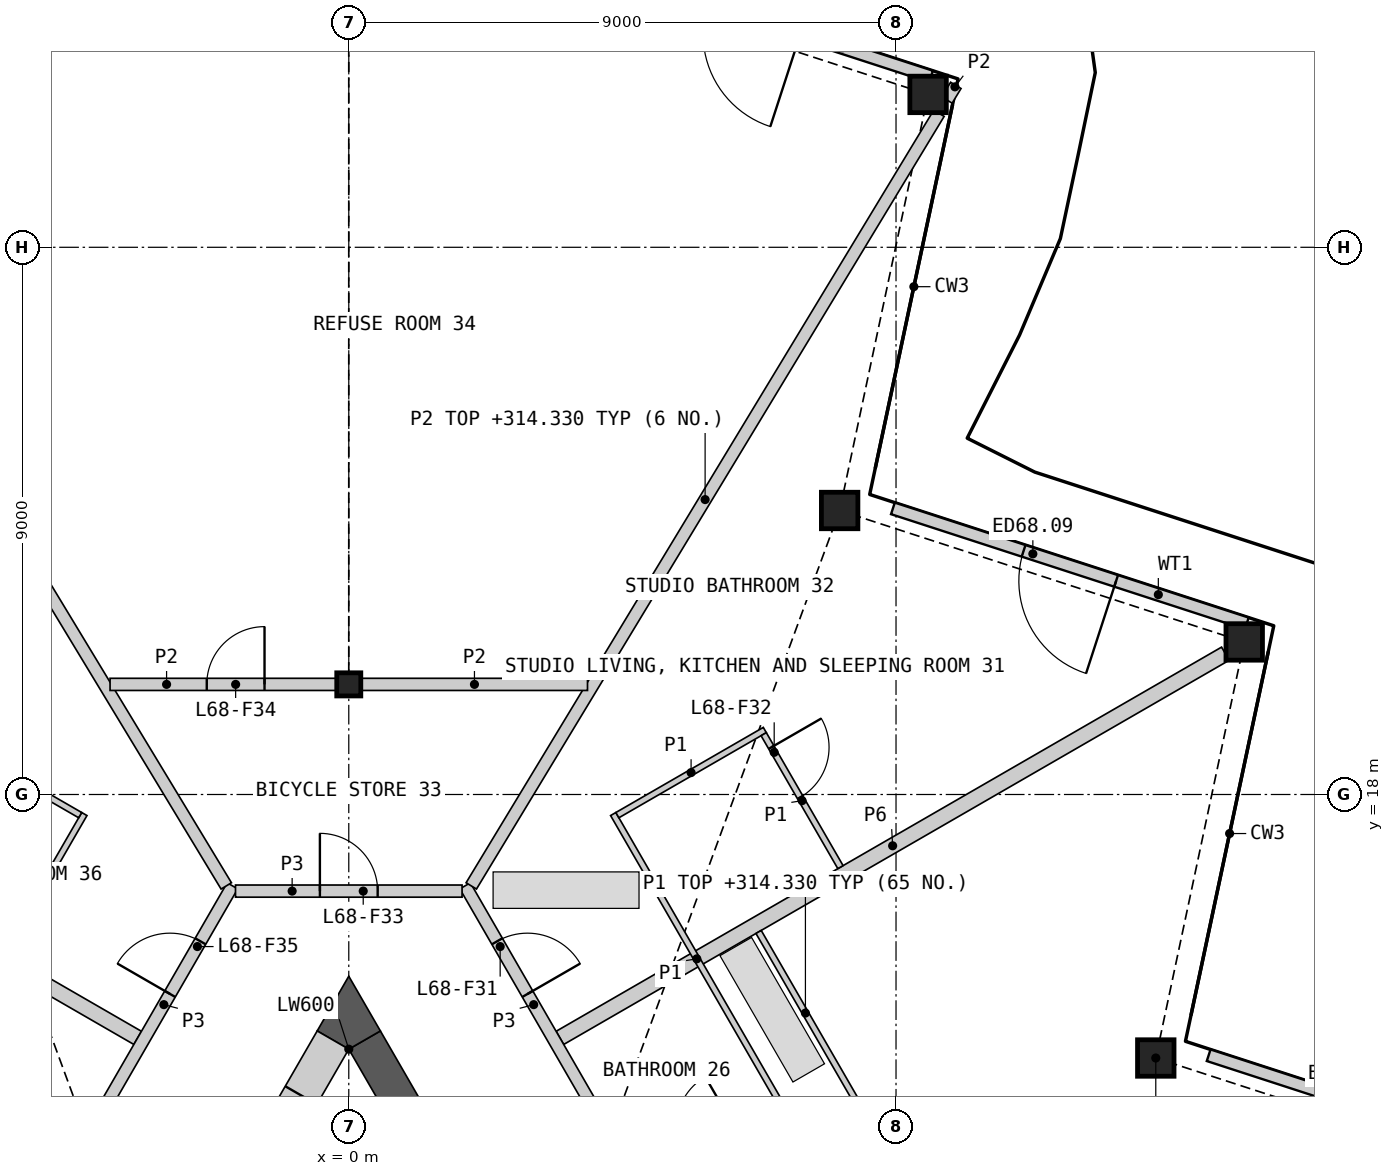
"""IFC4 building model, lengths in metres.
Left out: names, types, materials, properties, quantities, classifications, styles, units other than length and angle.
Written with IfcOpenShell. Run it as: python <this file> out.ifc"""

import sys

from ifc_helpers import new_model, si_unit, direction, frame, frame_2d, origin, origin_2d, place, context, subcontext, project, spatial, polyline, rectangle, hollow_rectangle, i_section, outline, extrude, element, fill, save


model = new_model("IFC4")
c1 = context("Model", 3, precision=1e-05, world=origin(), true_north=direction((0.0, 1.0)))
c2 = subcontext(c1, "Body", "Model", "MODEL_VIEW")
j1 = project(units=[si_unit("LENGTHUNIT", "METRE"), si_unit("PLANEANGLEUNIT", "RADIAN")], contexts=[c1])
p1 = place(None, origin())
s1 = spatial("IfcSite", under=j1, at=p1, CompositionType="ELEMENT")
p2 = place(p1, origin())
s2 = spatial("IfcBuilding", under=s1, at=p2, CompositionType="ELEMENT")
p3 = place(p2, frame((0.0, 0.0, 312.0)))
s3 = spatial("IfcBuildingStorey", under=s2, at=p3, CompositionType="ELEMENT", Elevation=312.0)
for number, where, z_axis, x_axis in (
    (1, (13.272, 13.666, 0.0), (0.0, 0.0, 1.0), (1.0, 0.0, 0.0)),
    (2, (14.727, 20.509, 0.0), (0.0, 0.0, 1.0), (1.0, 0.0, 0.0)),
    (3, (8.073, 22.671, 0.0), (0.0, 0.0, 1.0), (1.0, 0.0, 0.0)),
    (4, (9.527, 29.514, 0.0), (0.0, 0.0, 1.0), (1.0, 0.0, 0.0)),
):
    element("IfcColumn", number, at=place(p3, frame(where, z_axis=z_axis, x_axis=x_axis)), inside=s3, PredefinedType="COLUMN", context=c2, shape_type="SweptSolid", body=[
        extrude(hollow_rectangle(XDim=0.6, YDim=0.6, WallThickness=0.04, at=origin_2d()), origin(), (0.0, 0.0, 1.0), 3.4),
    ])
p4 = place(p3, frame((0.0, 19.811, 0.0), z_axis=(0.0, 0.0, 1.0), x_axis=(1.0, 0.0, 0.0)))
e5 = element("IfcColumn", 5, at=p4, inside=s3, PredefinedType="COLUMN", context=c2, shape_type="SweptSolid", body=[
    extrude(i_section(OverallWidth=0.396, OverallDepth=0.381, WebThickness=0.019, FlangeThickness=0.03, at=origin_2d()), origin(), (0.0, 0.0, 1.0), 3.4),
])
p5 = place(p3, frame((19.962, 11.82, 0.0), z_axis=(0.0, 0.0, 1.0), x_axis=(-0.951053709789, 0.309025631781, 0.0)))
e6 = element("IfcWall", 6, at=p5, inside=s3, PredefinedType="SOLIDWALL", context=c2, shape_type="SweptSolid", body=[
    extrude(rectangle(XDim=6.12, YDim=0.2, at=frame_2d((3.06, 0.0))), origin(), (0.0, 0.0, 1.0), 2.488),
])
p6 = place(p5, frame((2.26, 0.0, 0.0)))
e7 = element("IfcOpeningElement", 7, at=p6, cuts=e6, PredefinedType="OPENING", context=c2, shape_type="SweptSolid", body=[
    extrude(rectangle(XDim=1.6, YDim=2.25, at=frame_2d((0.8, 1.125))), frame((0.0, 0.11, 0.0), z_axis=(0.0, -1.0, 0.0), x_axis=(1.0, 0.0, 0.0)), (0.0, 0.0, 1.0), 0.22),
])
p7 = place(p3, frame((14.769, 20.814, 0.0), z_axis=(0.0, 0.0, 1.0), x_axis=(-0.951069243123, 0.308977822483, 0.0)))
e8 = element("IfcWall", 8, at=p7, inside=s3, PredefinedType="SOLIDWALL", context=c2, shape_type="SweptSolid", body=[
    extrude(rectangle(XDim=6.12, YDim=0.2, at=frame_2d((3.06, 0.0))), origin(), (0.0, 0.0, 1.0), 2.488),
])
p8 = place(p7, frame((2.26, 0.0, 0.0)))
e9 = element("IfcOpeningElement", 9, at=p8, cuts=e8, PredefinedType="OPENING", context=c2, shape_type="SweptSolid", body=[
    extrude(rectangle(XDim=1.6, YDim=2.25, at=frame_2d((0.8, 1.125))), frame((0.0, 0.11, 0.0), z_axis=(0.0, -1.0, 0.0), x_axis=(1.0, 0.0, 0.0)), (0.0, 0.0, 1.0), 0.22),
])
p9 = place(p3, frame((9.576, 29.809, 0.0), z_axis=(0.0, 0.0, 1.0), x_axis=(-0.951053709789, 0.309025631781, 0.0)))
e10 = element("IfcWall", 10, at=p9, inside=s3, PredefinedType="SOLIDWALL", context=c2, shape_type="SweptSolid", body=[
    extrude(rectangle(XDim=6.12, YDim=0.2, at=frame_2d((3.06, 0.0))), origin(), (0.0, 0.0, 1.0), 2.488),
])
p10 = place(p9, frame((2.26, 0.0, 0.0)))
e11 = element("IfcOpeningElement", 11, at=p10, cuts=e10, PredefinedType="OPENING", context=c2, shape_type="SweptSolid", body=[
    extrude(rectangle(XDim=1.6, YDim=2.25, at=frame_2d((0.8, 1.125))), frame((0.0, 0.11, 0.0), z_axis=(0.0, -1.0, 0.0), x_axis=(1.0, 0.0, 0.0)), (0.0, 0.0, 1.0), 0.22),
])
p11 = place(p3, frame((2.361, 10.322, 0.0), z_axis=(0.0, 0.0, 1.0), x_axis=(-0.500000735859, 0.866024978935, 0.0)))
e12 = element("IfcWall", 12, at=p11, inside=s3, PredefinedType="SHEAR", context=c2, shape_type="SweptSolid", body=[
    extrude(rectangle(XDim=4.202, YDim=0.6, at=frame_2d((2.101, 0.0))), origin(), (0.0, 0.0, 1.0), 3.1),
])
p12 = place(p3, origin())
e13 = element("IfcWall", 13, at=p12, inside=s3, PredefinedType="SHEAR", context=c2, shape_type="SweptSolid", body=[
    extrude(outline(polyline([(0.0, 13.811), (-0.52, 14.111), (0.0, 15.011), (0.52, 14.111), (0.0, 13.811)])), origin(), (0.0, 0.0, 1.0), 3.1),
])
p13 = place(p3, frame((-0.26, 13.961, 0.0), z_axis=(0.0, 0.0, 1.0), x_axis=(-0.49997936161, -0.866037319036, 0.0)))
e14 = element("IfcWall", 14, at=p13, inside=s3, PredefinedType="SHEAR", context=c2, shape_type="SweptSolid", body=[
    extrude(rectangle(XDim=2.66, YDim=0.6, at=frame_2d((1.33, 0.0))), origin(), (0.0, 0.0, 1.0), 3.1),
])
p14 = place(p13, frame((1.05, 0.0, 0.0)))
e15 = element("IfcOpeningElement", 15, at=p14, cuts=e14, PredefinedType="OPENING", context=c2, shape_type="SweptSolid", body=[
    extrude(rectangle(XDim=1.0, YDim=2.1, at=frame_2d((0.5, 1.05))), frame((0.0, 0.31, 0.0), z_axis=(0.0, -1.0, 0.0), x_axis=(1.0, 0.0, 0.0)), (0.0, 0.0, 1.0), 0.62),
])
p15 = place(p3, frame((3.472, 13.997, 0.0), z_axis=(0.0, 0.0, 1.0), x_axis=(0.866029233976, 0.499993365855, 0.0)))
e16 = element("IfcWall", 16, at=p15, inside=s3, PredefinedType="PARTITIONING", context=c2, shape_type="SweptSolid", body=[
    extrude(rectangle(XDim=12.637, YDim=0.25, at=frame_2d((6.319, 0.0))), origin(), (0.0, 0.0, 1.0), 2.33),
])
p16 = place(p3, frame((-8.257, 16.76, 0.0), z_axis=(0.0, 0.0, 1.0), x_axis=(0.866034739526, -0.499983829672, 0.0)))
e17 = element("IfcWall", 17, at=p16, inside=s3, PredefinedType="PARTITIONING", context=c2, shape_type="SweptSolid", body=[
    extrude(rectangle(XDim=5.525, YDim=0.25, at=frame_2d((2.763, 0.0))), origin(), (0.0, 0.0, 1.0), 2.33),
])
p17 = place(p3, frame((1.913, 16.498, 0.0), z_axis=(0.0, 0.0, 1.0), x_axis=(0.499950370306, -0.866054055606, 0.0)))
e18 = element("IfcWall", 18, at=p17, inside=s3, PredefinedType="PARTITIONING", context=c2, shape_type="SweptSolid", body=[
    extrude(rectangle(XDim=4.513, YDim=0.2, at=frame_2d((2.256, 0.0))), origin(), (0.0, 0.0, 1.0), 3.1),
])
p18 = place(p17, frame((1.053, 0.0, 0.0)))
e19 = element("IfcOpeningElement", 19, at=p18, cuts=e18, PredefinedType="OPENING", context=c2, shape_type="SweptSolid", body=[
    extrude(rectangle(XDim=1.0, YDim=2.1, at=frame_2d((0.5, 1.05))), frame((0.0, 0.11, 0.0), z_axis=(0.0, -1.0, 0.0), x_axis=(1.0, 0.0, 0.0)), (0.0, 0.0, 1.0), 0.22),
])
p19 = place(p3, frame((-4.169, 12.59, 0.0), z_axis=(0.0, 0.0, 1.0), x_axis=(0.499950370306, 0.866054055606, 0.0)))
e20 = element("IfcWall", 20, at=p19, inside=s3, PredefinedType="PARTITIONING", context=c2, shape_type="SweptSolid", body=[
    extrude(rectangle(XDim=4.513, YDim=0.2, at=frame_2d((2.256, 0.0))), origin(), (0.0, 0.0, 1.0), 3.1),
])
p20 = place(p19, frame((2.459, 0.0, 0.0)))
e21 = element("IfcOpeningElement", 21, at=p20, cuts=e20, PredefinedType="OPENING", context=c2, shape_type="SweptSolid", body=[
    extrude(rectangle(XDim=1.0, YDim=2.1, at=frame_2d((0.5, 1.05))), frame((0.0, 0.11, 0.0), z_axis=(0.0, -1.0, 0.0), x_axis=(1.0, 0.0, 0.0)), (0.0, 0.0, 1.0), 0.22),
])
p21 = place(p3, frame((-1.863, 16.411, 0.0), z_axis=(0.0, 0.0, 1.0), x_axis=(1.0, 0.0, 0.0)))
e22 = element("IfcWall", 22, at=p21, inside=s3, PredefinedType="PARTITIONING", context=c2, shape_type="SweptSolid", body=[
    extrude(rectangle(XDim=3.726, YDim=0.2, at=frame_2d((1.863, 0.0))), origin(), (0.0, 0.0, 1.0), 3.1),
])
p22 = place(p21, frame((1.388, 0.0, 0.0)))
e23 = element("IfcOpeningElement", 23, at=p22, cuts=e22, PredefinedType="OPENING", context=c2, shape_type="SweptSolid", body=[
    extrude(rectangle(XDim=0.95, YDim=2.1, at=frame_2d((0.475, 1.05))), frame((0.0, 0.11, 0.0), z_axis=(0.0, -1.0, 0.0), x_axis=(1.0, 0.0, 0.0)), (0.0, 0.0, 1.0), 0.22),
])
p23 = place(p3, frame((2.015, 16.497, 0.0), z_axis=(0.0, 0.0, 1.0), x_axis=(0.517779253395, 0.855514257482, 0.0)))
e24 = element("IfcWall", 24, at=p23, inside=s3, PredefinedType="PARTITIONING", context=c2, shape_type="SweptSolid", body=[
    extrude(rectangle(XDim=14.854, YDim=0.2, at=frame_2d((7.427, 0.0))), origin(), (0.0, 0.0, 1.0), 2.33),
])
p24 = place(p3, frame((-9.669, 29.144, 0.0), z_axis=(0.0, 0.0, 1.0), x_axis=(0.517770554559, -0.85551952218, 0.0)))
e25 = element("IfcWall", 25, at=p24, inside=s3, PredefinedType="PARTITIONING", context=c2, shape_type="SweptSolid", body=[
    extrude(rectangle(XDim=14.784, YDim=0.2, at=frame_2d((7.392, 0.0))), origin(), (0.0, 0.0, 1.0), 2.33),
])
p25 = place(p3, frame((-3.926, 19.811, 0.0), z_axis=(0.0, 0.0, 1.0), x_axis=(1.0, 0.0, 0.0)))
e26 = element("IfcWall", 26, at=p25, inside=s3, PredefinedType="PARTITIONING", context=c2, shape_type="SweptSolid", body=[
    extrude(rectangle(XDim=3.718, YDim=0.2, at=frame_2d((1.859, 0.0))), origin(), (0.0, 0.0, 1.0), 2.33),
])
p26 = place(p25, frame((1.59, 0.0, 0.0)))
e27 = element("IfcOpeningElement", 27, at=p26, cuts=e26, PredefinedType="OPENING", context=c2, shape_type="SweptSolid", body=[
    extrude(rectangle(XDim=0.95, YDim=2.1, at=frame_2d((0.475, 1.05))), frame((0.0, 0.11, 0.0), z_axis=(0.0, -1.0, 0.0), x_axis=(1.0, 0.0, 0.0)), (0.0, 0.0, 1.0), 0.22),
])
p27 = place(p3, frame((0.208, 19.811, 0.0), z_axis=(0.0, 0.0, 1.0), x_axis=(1.0, 0.0, 0.0)))
e28 = element("IfcWall", 28, at=p27, inside=s3, PredefinedType="PARTITIONING", context=c2, shape_type="SweptSolid", body=[
    extrude(rectangle(XDim=3.718, YDim=0.2, at=frame_2d((1.859, 0.0))), origin(), (0.0, 0.0, 1.0), 2.33),
])
p28 = place(p3, frame((9.837, 29.422, 0.0), z_axis=(0.0, 0.0, 1.0), x_axis=(0.517419338909, 0.855731983581, 0.0)))
e29 = element("IfcWall", 29, at=p28, inside=s3, PredefinedType="PARTITIONING", context=c2, shape_type="SweptSolid", body=[
    extrude(rectangle(XDim=0.282, YDim=0.2, at=frame_2d((0.141, 0.0))), origin(), (0.0, 0.0, 1.0), 2.33),
])
p29 = place(p3, frame((6.74, 15.739, 0.0), z_axis=(0.0, 0.0, 1.0), x_axis=(0.499995022685, -0.86602827742, 0.0)))
e30 = element("IfcWall", 30, at=p29, inside=s3, PredefinedType="PARTITIONING", context=c2, shape_type="SweptSolid", body=[
    extrude(rectangle(XDim=15.404, YDim=0.1, at=frame_2d((7.702, 0.0))), origin(), (0.0, 0.0, 1.0), 2.33),
])
p30 = place(p29, frame((8.582, 0.0, 0.0)))
e31 = element("IfcOpeningElement", 31, at=p30, cuts=e30, PredefinedType="OPENING", context=c2, shape_type="SweptSolid", body=[
    extrude(rectangle(XDim=0.95, YDim=2.1, at=frame_2d((0.475, 1.05))), frame((0.0, 0.06, 0.0), z_axis=(0.0, -1.0, 0.0), x_axis=(1.0, 0.0, 0.0)), (0.0, 0.0, 1.0), 0.12),
])
p31 = place(p3, frame((4.349, 17.679, 0.0), z_axis=(0.0, 0.0, 1.0), x_axis=(0.49997732567, -0.866038494419, 0.0)))
e32 = element("IfcWall", 32, at=p31, inside=s3, PredefinedType="PARTITIONING", context=c2, shape_type="SweptSolid", body=[
    extrude(rectangle(XDim=5.5, YDim=0.1, at=frame_2d((2.75, 0.0))), origin(), (0.0, 0.0, 1.0), 2.33),
])
p32 = place(p3, frame((-7.099, 12.915, 0.0), z_axis=(0.0, 0.0, 1.0), x_axis=(0.49997732567, 0.866038494419, 0.0)))
e33 = element("IfcWall", 33, at=p32, inside=s3, PredefinedType="PARTITIONING", context=c2, shape_type="SweptSolid", body=[
    extrude(rectangle(XDim=5.5, YDim=0.1, at=frame_2d((2.75, 0.0))), origin(), (0.0, 0.0, 1.0), 2.33),
])
p33 = place(p32, frame((0.756, 0.0, 0.0)))
e34 = element("IfcOpeningElement", 34, at=p33, cuts=e33, PredefinedType="OPENING", context=c2, shape_type="SweptSolid", body=[
    extrude(rectangle(XDim=0.95, YDim=2.1, at=frame_2d((0.475, 1.05))), frame((0.0, 0.06, 0.0), z_axis=(0.0, -1.0, 0.0), x_axis=(1.0, 0.0, 0.0)), (0.0, 0.0, 1.0), 0.12),
])
for number, where, z_axis, x_axis in (
    (35, (4.417, 17.66, 0.0), (0.0, 0.0, 1.0), (0.866, 0.5, 0.0)),
    (36, (-6.842, 19.06, 0.0), (0.0, 0.0, 1.0), (0.866, -0.5, 0.0)),
):
    element("IfcWall", number, at=place(p3, frame(where, z_axis=z_axis, x_axis=x_axis)), inside=s3, PredefinedType="PARTITIONING", context=c2, shape_type="SweptSolid", body=[
        extrude(rectangle(XDim=2.8, YDim=0.1, at=frame_2d((1.4, 0.0))), origin(), (0.0, 0.0, 1.0), 2.33),
    ])
p34 = place(p3, frame((6.824, 18.992, 0.0), z_axis=(0.0, 0.0, 1.0), x_axis=(0.50001820224, -0.866014894461, 0.0)))
e37 = element("IfcWall", 37, at=p34, inside=s3, PredefinedType="PARTITIONING", context=c2, shape_type="SweptSolid", body=[
    extrude(rectangle(XDim=2.525, YDim=0.1, at=frame_2d((1.262, 0.0))), origin(), (0.0, 0.0, 1.0), 2.33),
])
p35 = place(p34, frame((0.25, 0.0, 0.0)))
e38 = element("IfcOpeningElement", 38, at=p35, cuts=e37, PredefinedType="OPENING", context=c2, shape_type="SweptSolid", body=[
    extrude(rectangle(XDim=0.95, YDim=2.1, at=frame_2d((0.475, 1.05))), frame((0.0, 0.06, 0.0), z_axis=(0.0, -1.0, 0.0), x_axis=(1.0, 0.0, 0.0)), (0.0, 0.0, 1.0), 0.12),
])
p36 = place(p8, origin())
e39 = element("IfcDoor", 39, at=p36, inside=s3, OperationType="DOUBLE_DOOR_SINGLE_SWING", PredefinedType="DOOR", context=c2, shape_type="SweptSolid", body=[
    extrude(rectangle(XDim=1.6, YDim=2.25, at=frame_2d((0.8, 1.125))), frame((0.0, 0.025, 0.0), z_axis=(0.0, -1.0, 0.0), x_axis=(1.0, 0.0, 0.0)), (0.0, 0.0, 1.0), 0.05),
])
fill(e9, e39)
p37 = place(p18, origin())
e40 = element("IfcDoor", 40, at=p37, inside=s3, OperationType="SINGLE_SWING_RIGHT", PredefinedType="DOOR", context=c2, shape_type="SweptSolid", body=[
    extrude(rectangle(XDim=1.0, YDim=2.1, at=frame_2d((0.5, 1.05))), frame((0.0, 0.025, 0.0), z_axis=(0.0, -1.0, 0.0), x_axis=(1.0, 0.0, 0.0)), (0.0, 0.0, 1.0), 0.05),
])
fill(e19, e40)
p38 = place(p35, origin())
e41 = element("IfcDoor", 41, at=p38, inside=s3, OperationType="SINGLE_SWING_LEFT", PredefinedType="DOOR", context=c2, shape_type="SweptSolid", body=[
    extrude(rectangle(XDim=0.95, YDim=2.1, at=frame_2d((0.475, 1.05))), frame((0.0, 0.025, 0.0), z_axis=(0.0, -1.0, 0.0), x_axis=(1.0, 0.0, 0.0)), (0.0, 0.0, 1.0), 0.05),
])
fill(e38, e41)
p39 = place(p22, origin())
e42 = element("IfcDoor", 42, at=p39, inside=s3, OperationType="SINGLE_SWING_LEFT", PredefinedType="DOOR", context=c2, shape_type="SweptSolid", body=[
    extrude(rectangle(XDim=0.95, YDim=2.1, at=frame_2d((0.475, 1.05))), frame((0.0, 0.025, 0.0), z_axis=(0.0, -1.0, 0.0), x_axis=(1.0, 0.0, 0.0)), (0.0, 0.0, 1.0), 0.05),
])
fill(e23, e42)
p40 = place(p26, origin())
e43 = element("IfcDoor", 43, at=p40, inside=s3, OperationType="SINGLE_SWING_RIGHT", PredefinedType="DOOR", context=c2, shape_type="SweptSolid", body=[
    extrude(rectangle(XDim=0.95, YDim=2.1, at=frame_2d((0.475, 1.05))), frame((0.0, 0.025, 0.0), z_axis=(0.0, -1.0, 0.0), x_axis=(1.0, 0.0, 0.0)), (0.0, 0.0, 1.0), 0.05),
])
fill(e27, e43)
p41 = place(p20, origin())
e44 = element("IfcDoor", 44, at=p41, inside=s3, OperationType="SINGLE_SWING_LEFT", PredefinedType="DOOR", context=c2, shape_type="SweptSolid", body=[
    extrude(rectangle(XDim=1.0, YDim=2.1, at=frame_2d((0.5, 1.05))), frame((0.0, 0.025, 0.0), z_axis=(0.0, -1.0, 0.0), x_axis=(1.0, 0.0, 0.0)), (0.0, 0.0, 1.0), 0.05),
])
fill(e21, e44)
save(model, sys.argv[1])
